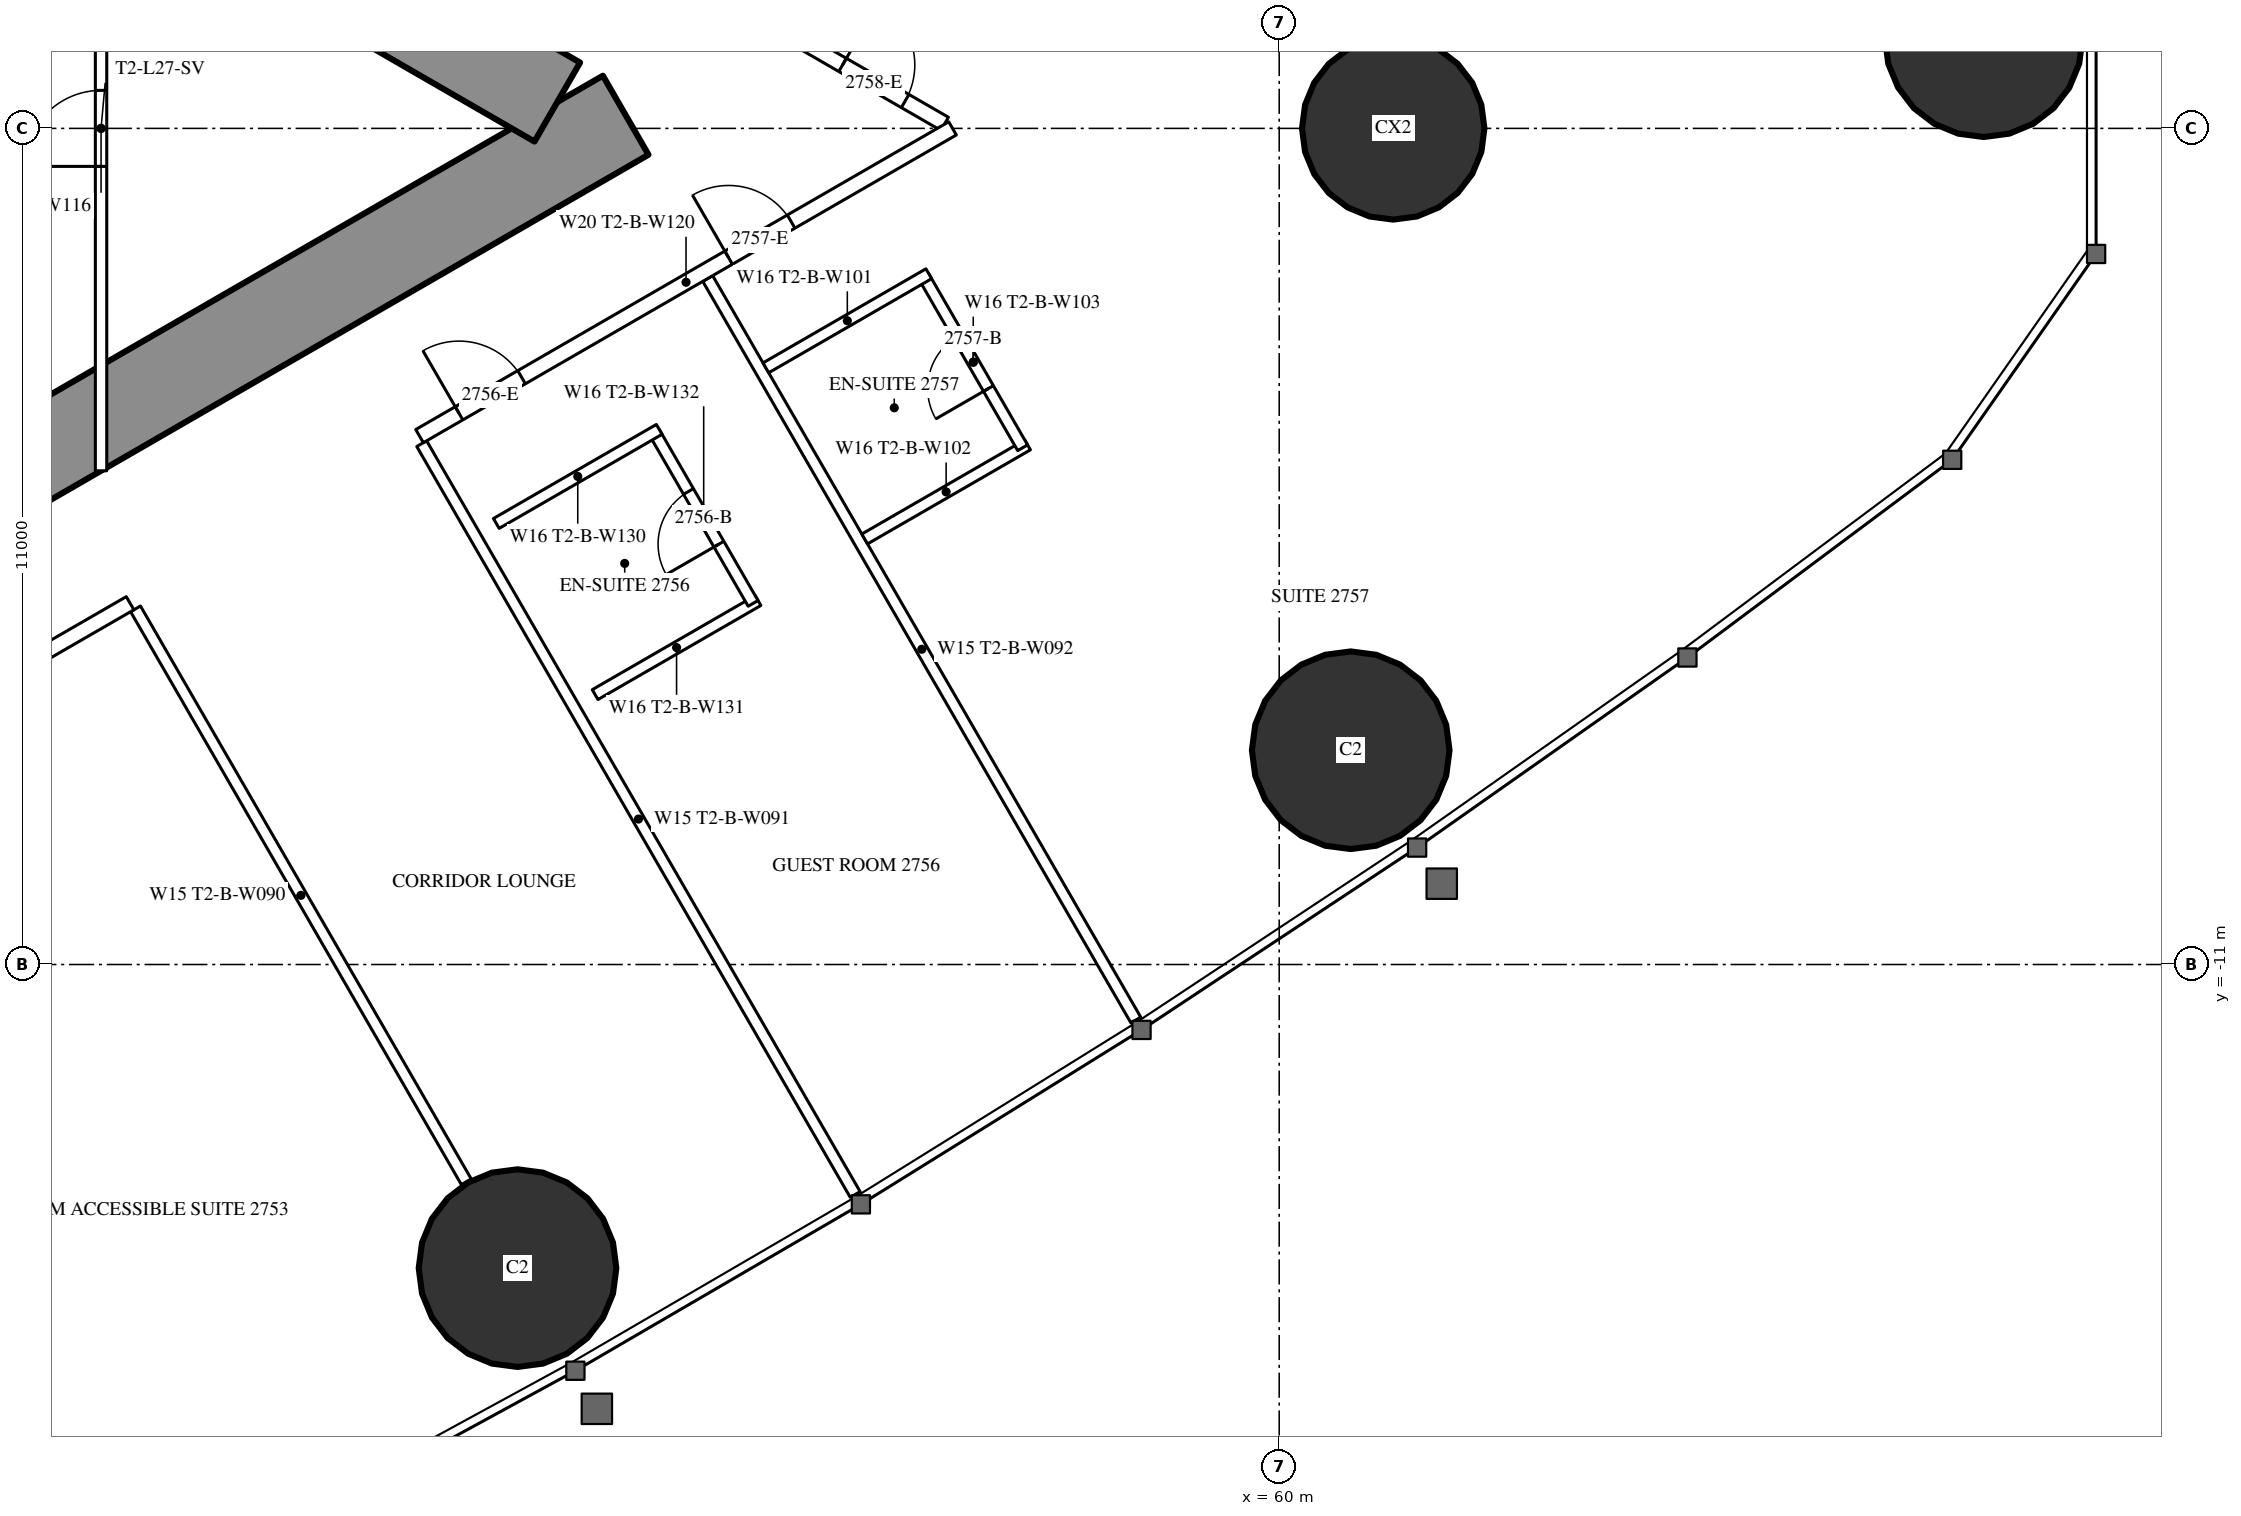
"""IFC4 building model, lengths in metres.
Left out: names, types, materials, properties, quantities, classifications, styles, units other than length and angle.
Written with IfcOpenShell. Run it as: python <this file> out.ifc"""

import sys

from ifc_helpers import new_model, si_unit, direction, frame, frame_2d, origin, origin_2d, place, context, subcontext, project, spatial, rectangle, circle, hollow_circle, extrude, element, fill, save


model = new_model("IFC4")
c1 = context("Model", 3, precision=1e-05, world=origin(), true_north=direction((0.0, 1.0)))
c2 = subcontext(c1, "Body", "Model", "MODEL_VIEW")
j1 = project(units=[si_unit("LENGTHUNIT", "METRE"), si_unit("PLANEANGLEUNIT", "RADIAN")], contexts=[c1])
p1 = place(None, origin())
s1 = spatial("IfcSite", under=j1, at=p1, CompositionType="ELEMENT")
p2 = place(p1, origin())
s2 = spatial("IfcBuilding", under=s1, at=p2, CompositionType="ELEMENT")
p3 = place(p2, frame((0.0, 0.0, 104.6)))
s3 = spatial("IfcBuildingStorey", under=s2, at=p3, CompositionType="ELEMENT", Elevation=104.6)
for number, where, z_axis, x_axis in (
    (1, (69.269, 1.187, 0.0), (0.0, 0.0, 1.0), (1.0, 0.0, 0.0)),
    (2, (49.979, -14.994, 0.0), (0.0, 0.0, 1.0), (1.0, 0.0, 0.0)),
    (3, (60.941, -8.181, 0.0), (0.0, 0.0, 1.0), (1.0, 0.0, 0.0)),
):
    element("IfcColumn", number, at=place(p3, frame(where, z_axis=z_axis, x_axis=x_axis)), inside=s3, PredefinedType="COLUMN", context=c2, shape_type="SweptSolid", body=[
        extrude(hollow_circle(Radius=1.3, WallThickness=0.1, at=origin_2d()), origin(), (0.0, 0.0, 1.0), 3.5),
    ])
p4 = place(p3, frame((61.5, 0.0, 0.0), z_axis=(0.0, 0.0, 1.0), x_axis=(1.0, 0.0, 0.0)))
e4 = element("IfcColumn", 4, at=p4, inside=s3, PredefinedType="COLUMN", context=c2, shape_type="SweptSolid", body=[
    extrude(circle(Radius=1.2, at=origin_2d()), origin(), (0.0, 0.0, 1.0), 3.5),
])
p5 = place(p3, frame((27.2, -13.8, 0.0), z_axis=(0.0, 0.0, 1.0), x_axis=(0.866027159892, 0.499996958321, 0.0)))
e5 = element("IfcWall", 5, at=p5, inside=s3, PredefinedType="SHEAR", context=c2, shape_type="SweptSolid", body=[
    extrude(rectangle(XDim=27.947, YDim=1.2, at=frame_2d((13.973, 0.0))), origin(), (0.0, 0.0, 1.0), 3.5),
])
p6 = place(p5, frame((4.6, 0.0, 0.0)))
e6 = element("IfcOpeningElement", 6, at=p6, cuts=e5, PredefinedType="OPENING", context=c2, shape_type="SweptSolid", body=[
    extrude(rectangle(XDim=1.0, YDim=2.2, at=frame_2d((0.5, 1.1))), frame((0.0, 0.61, 0.0), z_axis=(0.0, -1.0, 0.0), x_axis=(1.0, 0.0, 0.0)), (0.0, 0.0, 1.0), 1.22),
])
p7 = place(p5, frame((13.395, 0.0, 0.0)))
e7 = element("IfcOpeningElement", 7, at=p7, cuts=e5, PredefinedType="OPENING", context=c2, shape_type="SweptSolid", body=[
    extrude(rectangle(XDim=1.8, YDim=2.2, at=frame_2d((0.9, 1.1))), frame((0.0, 0.61, 0.0), z_axis=(0.0, -1.0, 0.0), x_axis=(1.0, 0.0, 0.0)), (0.0, 0.0, 1.0), 1.22),
])
p8 = place(p3, frame((27.2, 13.8, 0.0), z_axis=(0.0, 0.0, 1.0), x_axis=(0.866024515034, -0.500001539357, 0.0)))
e8 = element("IfcWall", 8, at=p8, inside=s3, PredefinedType="SHEAR", context=c2, shape_type="SweptSolid", body=[
    extrude(rectangle(XDim=26.907, YDim=1.2, at=frame_2d((13.454, 0.0))), origin(), (0.0, 0.0, 1.0), 3.5),
])
p9 = place(p8, frame((4.6, 0.0, 0.0)))
e9 = element("IfcOpeningElement", 9, at=p9, cuts=e8, PredefinedType="OPENING", context=c2, shape_type="SweptSolid", body=[
    extrude(rectangle(XDim=1.0, YDim=2.2, at=frame_2d((0.5, 1.1))), frame((0.0, 0.61, 0.0), z_axis=(0.0, -1.0, 0.0), x_axis=(1.0, 0.0, 0.0)), (0.0, 0.0, 1.0), 1.22),
])
p10 = place(p8, frame((13.395, 0.0, 0.0)))
e10 = element("IfcOpeningElement", 10, at=p10, cuts=e8, PredefinedType="OPENING", context=c2, shape_type="SweptSolid", body=[
    extrude(rectangle(XDim=1.8, YDim=2.2, at=frame_2d((0.9, 1.1))), frame((0.0, 0.61, 0.0), z_axis=(0.0, -1.0, 0.0), x_axis=(1.0, 0.0, 0.0)), (0.0, 0.0, 1.0), 1.22),
])
p11 = place(p3, frame((44.954, -6.321, 0.0), z_axis=(0.0, 0.0, 1.0), x_axis=(0.500018676722, -0.866014620505, 0.0)))
e11 = element("IfcWall", 11, at=p11, inside=s3, PredefinedType="PARTITIONING", context=c2, shape_type="SweptSolid", body=[
    extrude(rectangle(XDim=8.704, YDim=0.15, at=frame_2d((4.352, 0.0))), origin(), (0.0, 0.0, 1.0), 2.2),
])
p12 = place(p3, frame((48.719, -4.147, 0.0), z_axis=(0.0, 0.0, 1.0), x_axis=(0.499990498062, -0.866030889661, 0.0)))
e12 = element("IfcWall", 12, at=p12, inside=s3, PredefinedType="PARTITIONING", context=c2, shape_type="SweptSolid", body=[
    extrude(rectangle(XDim=11.406, YDim=0.15, at=frame_2d((5.703, 0.0))), origin(), (0.0, 0.0, 1.0), 3.25),
])
p13 = place(p3, frame((52.481, -1.975, 0.0), z_axis=(0.0, 0.0, 1.0), x_axis=(0.500003867771, -0.866023170714, 0.0)))
e13 = element("IfcWall", 13, at=p13, inside=s3, PredefinedType="PARTITIONING", context=c2, shape_type="SweptSolid", body=[
    extrude(rectangle(XDim=11.265, YDim=0.15, at=frame_2d((5.632, 0.0))), origin(), (0.0, 0.0, 1.0), 3.25),
])
p14 = place(p3, frame((36.834, 10.894, 0.0), z_axis=(0.0, 0.0, 1.0), x_axis=(0.866028157229, -0.499995230863, 0.0)))
e14 = element("IfcWall", 14, at=p14, inside=s3, PredefinedType="PARTITIONING", context=c2, shape_type="SweptSolid", body=[
    extrude(rectangle(XDim=21.667, YDim=0.2, at=frame_2d((10.833, 0.0))), origin(), (0.0, 0.0, 1.0), 3.25),
])
p15 = place(p14, frame((20.117, 0.0, 0.0)))
e15 = element("IfcOpeningElement", 15, at=p15, cuts=e14, PredefinedType="OPENING", context=c2, shape_type="SweptSolid", body=[
    extrude(rectangle(XDim=0.95, YDim=2.2, at=frame_2d((0.475, 1.1))), frame((0.0, 0.11, 0.0), z_axis=(0.0, -1.0, 0.0), x_axis=(1.0, 0.0, 0.0)), (0.0, 0.0, 1.0), 0.22),
])
p16 = place(p14, frame((14.335, 0.0, 0.0)))
e16 = element("IfcOpeningElement", 16, at=p16, cuts=e14, PredefinedType="OPENING", context=c2, shape_type="SweptSolid", body=[
    extrude(rectangle(XDim=0.95, YDim=2.2, at=frame_2d((0.475, 1.1))), frame((0.0, 0.11, 0.0), z_axis=(0.0, -1.0, 0.0), x_axis=(1.0, 0.0, 0.0)), (0.0, 0.0, 1.0), 0.22),
])
p17 = place(p14, frame((9.693, 0.0, 0.0)))
e17 = element("IfcOpeningElement", 17, at=p17, cuts=e14, PredefinedType="OPENING", context=c2, shape_type="SweptSolid", body=[
    extrude(rectangle(XDim=0.95, YDim=2.2, at=frame_2d((0.475, 1.1))), frame((0.0, 0.11, 0.0), z_axis=(0.0, -1.0, 0.0), x_axis=(1.0, 0.0, 0.0)), (0.0, 0.0, 1.0), 0.22),
])
p18 = place(p14, frame((2.95, 0.0, 0.0)))
e18 = element("IfcOpeningElement", 18, at=p18, cuts=e14, PredefinedType="OPENING", context=c2, shape_type="SweptSolid", body=[
    extrude(rectangle(XDim=0.95, YDim=2.2, at=frame_2d((0.475, 1.1))), frame((0.0, 0.11, 0.0), z_axis=(0.0, -1.0, 0.0), x_axis=(1.0, 0.0, 0.0)), (0.0, 0.0, 1.0), 0.22),
])
p19 = place(p3, frame((37.96, -10.243, 0.0), z_axis=(0.0, 0.0, 1.0), x_axis=(0.86603350054, 0.499985975746, 0.0)))
e19 = element("IfcWall", 19, at=p19, inside=s3, PredefinedType="PARTITIONING", context=c2, shape_type="SweptSolid", body=[
    extrude(rectangle(XDim=7.993, YDim=0.2, at=frame_2d((3.997, 0.0))), origin(), (0.0, 0.0, 1.0), 3.25),
])
p20 = place(p19, frame((3.35, 0.0, 0.0)))
e20 = element("IfcOpeningElement", 20, at=p20, cuts=e19, PredefinedType="OPENING", context=c2, shape_type="SweptSolid", body=[
    extrude(rectangle(XDim=1.0, YDim=2.2, at=frame_2d((0.5, 1.1))), frame((0.0, 0.11, 0.0), z_axis=(0.0, -1.0, 0.0), x_axis=(1.0, 0.0, 0.0)), (0.0, 0.0, 1.0), 0.22),
])
p21 = place(p3, frame((48.69, -4.048, 0.0), z_axis=(0.0, 0.0, 1.0), x_axis=(0.866026410209, 0.499998256818, 0.0)))
e21 = element("IfcWall", 21, at=p21, inside=s3, PredefinedType="PARTITIONING", context=c2, shape_type="SweptSolid", body=[
    extrude(rectangle(XDim=8.097, YDim=0.2, at=frame_2d((4.048, 0.0))), origin(), (0.0, 0.0, 1.0), 3.25),
])
p22 = place(p21, frame((0.6, 0.0, 0.0)))
e22 = element("IfcOpeningElement", 22, at=p22, cuts=e21, PredefinedType="OPENING", context=c2, shape_type="SweptSolid", body=[
    extrude(rectangle(XDim=0.95, YDim=2.2, at=frame_2d((0.475, 1.1))), frame((0.0, 0.11, 0.0), z_axis=(0.0, -1.0, 0.0), x_axis=(1.0, 0.0, 0.0)), (0.0, 0.0, 1.0), 0.22),
])
p23 = place(p21, frame((4.695, 0.0, 0.0)))
e23 = element("IfcOpeningElement", 23, at=p23, cuts=e21, PredefinedType="OPENING", context=c2, shape_type="SweptSolid", body=[
    extrude(rectangle(XDim=0.95, YDim=2.2, at=frame_2d((0.475, 1.1))), frame((0.0, 0.11, 0.0), z_axis=(0.0, -1.0, 0.0), x_axis=(1.0, 0.0, 0.0)), (0.0, 0.0, 1.0), 0.22),
])
p24 = place(p3, frame((51.0, -7.449, 0.0), z_axis=(0.0, 0.0, 1.0), x_axis=(0.866006523861, 0.500032699561, 0.0)))
e24 = element("IfcWall", 24, at=p24, inside=s3, PredefinedType="PARTITIONING", context=c2, shape_type="SweptSolid", body=[
    extrude(rectangle(XDim=2.475, YDim=0.15, at=frame_2d((1.237, 0.0))), origin(), (0.0, 0.0, 1.0), 3.25),
])
p25 = place(p3, frame((51.778, -3.998, 0.0), z_axis=(0.0, 0.0, 1.0), x_axis=(0.500047596559, -0.865997922154, 0.0)))
e25 = element("IfcWall", 25, at=p25, inside=s3, PredefinedType="PARTITIONING", context=c2, shape_type="SweptSolid", body=[
    extrude(rectangle(XDim=2.6, YDim=0.15, at=frame_2d((1.3, 0.0))), origin(), (0.0, 0.0, 1.0), 3.25),
])
p26 = place(p25, frame((0.9, 0.0, 0.0)))
e26 = element("IfcOpeningElement", 26, at=p26, cuts=e25, PredefinedType="OPENING", context=c2, shape_type="SweptSolid", body=[
    extrude(rectangle(XDim=0.8, YDim=2.2, at=frame_2d((0.4, 1.1))), frame((0.0, 0.085, 0.0), z_axis=(0.0, -1.0, 0.0), x_axis=(1.0, 0.0, 0.0)), (0.0, 0.0, 1.0), 0.17),
])
for number, where, z_axis, x_axis in (
    (27, (49.7, -5.198, 0.0), (0.0, 0.0, 1.0), (0.866, 0.5, 0.0)),
    (28, (54.546, -5.402, 0.0), (0.0, 0.0, 1.0), (0.866, 0.5, 0.0)),
):
    element("IfcWall", number, at=place(p3, frame(where, z_axis=z_axis, x_axis=x_axis)), inside=s3, PredefinedType="PARTITIONING", context=c2, shape_type="SweptSolid", body=[
        extrude(rectangle(XDim=2.475, YDim=0.15, at=frame_2d((1.237, 0.0))), origin(), (0.0, 0.0, 1.0), 3.25),
    ])
p27 = place(p3, frame((55.325, -1.95, 0.0), z_axis=(0.0, 0.0, 1.0), x_axis=(0.500006934395, -0.866021400173, 0.0)))
e29 = element("IfcWall", 29, at=p27, inside=s3, PredefinedType="PARTITIONING", context=c2, shape_type="SweptSolid", body=[
    extrude(rectangle(XDim=2.6, YDim=0.15, at=frame_2d((1.3, 0.0))), origin(), (0.0, 0.0, 1.0), 3.25),
])
p28 = place(p27, frame((0.9, 0.0, 0.0)))
e30 = element("IfcOpeningElement", 30, at=p28, cuts=e29, PredefinedType="OPENING", context=c2, shape_type="SweptSolid", body=[
    extrude(rectangle(XDim=0.8, YDim=2.2, at=frame_2d((0.4, 1.1))), frame((0.0, 0.085, 0.0), z_axis=(0.0, -1.0, 0.0), x_axis=(1.0, 0.0, 0.0)), (0.0, 0.0, 1.0), 0.17),
])
p29 = place(p3, frame((53.246, -3.15, 0.0), z_axis=(0.0, 0.0, 1.0), x_axis=(0.866006523861, 0.500032699561, 0.0)))
e31 = element("IfcWall", 31, at=p29, inside=s3, PredefinedType="PARTITIONING", context=c2, shape_type="SweptSolid", body=[
    extrude(rectangle(XDim=2.475, YDim=0.15, at=frame_2d((1.237, 0.0))), origin(), (0.0, 0.0, 1.0), 3.25),
])
p30 = place(p3, frame((44.5, -4.505, 0.0), z_axis=(0.0, 0.0, 1.0), x_axis=(0.0, 1.0, 0.0)))
e32 = element("IfcWall", 32, at=p30, inside=s3, PredefinedType="PARTITIONING", context=c2, shape_type="SweptSolid", body=[
    extrude(rectangle(XDim=9.009, YDim=0.15, at=frame_2d((4.505, 0.0))), origin(), (0.0, 0.0, 1.0), 2.45),
])
p31 = place(p30, frame((4.005, 0.0, 0.0)))
e33 = element("IfcOpeningElement", 33, at=p31, cuts=e32, PredefinedType="OPENING", context=c2, shape_type="SweptSolid", body=[
    extrude(rectangle(XDim=1.0, YDim=2.2, at=frame_2d((0.5, 1.1))), frame((0.0, 0.085, 0.0), z_axis=(0.0, -1.0, 0.0), x_axis=(1.0, 0.0, 0.0)), (0.0, 0.0, 1.0), 0.17),
])
p32 = place(p26, origin())
e34 = element("IfcDoor", 34, at=p32, inside=s3, OperationType="SINGLE_SWING_RIGHT", PredefinedType="DOOR", context=c2, shape_type="SweptSolid", body=[
    extrude(rectangle(XDim=0.8, YDim=2.2, at=frame_2d((0.4, 1.1))), frame((0.0, 0.025, 0.0), z_axis=(0.0, -1.0, 0.0), x_axis=(1.0, 0.0, 0.0)), (0.0, 0.0, 1.0), 0.05),
])
fill(e26, e34)
p33 = place(p22, origin())
e35 = element("IfcDoor", 35, at=p33, inside=s3, OperationType="SINGLE_SWING_LEFT", PredefinedType="DOOR", context=c2, shape_type="SweptSolid", body=[
    extrude(rectangle(XDim=0.95, YDim=2.2, at=frame_2d((0.475, 1.1))), frame((0.0, 0.025, 0.0), z_axis=(0.0, -1.0, 0.0), x_axis=(1.0, 0.0, 0.0)), (0.0, 0.0, 1.0), 0.05),
])
fill(e22, e35)
p34 = place(p28, origin())
e36 = element("IfcDoor", 36, at=p34, inside=s3, OperationType="SINGLE_SWING_RIGHT", PredefinedType="DOOR", context=c2, shape_type="SweptSolid", body=[
    extrude(rectangle(XDim=0.8, YDim=2.2, at=frame_2d((0.4, 1.1))), frame((0.0, 0.025, 0.0), z_axis=(0.0, -1.0, 0.0), x_axis=(1.0, 0.0, 0.0)), (0.0, 0.0, 1.0), 0.05),
])
fill(e30, e36)
p35 = place(p23, origin())
e37 = element("IfcDoor", 37, at=p35, inside=s3, OperationType="SINGLE_SWING_LEFT", PredefinedType="DOOR", context=c2, shape_type="SweptSolid", body=[
    extrude(rectangle(XDim=0.95, YDim=2.2, at=frame_2d((0.475, 1.1))), frame((0.0, 0.025, 0.0), z_axis=(0.0, -1.0, 0.0), x_axis=(1.0, 0.0, 0.0)), (0.0, 0.0, 1.0), 0.05),
])
fill(e23, e37)
p36 = place(p15, origin())
e38 = element("IfcDoor", 38, at=p36, inside=s3, OperationType="SINGLE_SWING_LEFT", PredefinedType="DOOR", context=c2, shape_type="SweptSolid", body=[
    extrude(rectangle(XDim=0.95, YDim=2.2, at=frame_2d((0.475, 1.1))), frame((0.0, 0.025, 0.0), z_axis=(0.0, -1.0, 0.0), x_axis=(1.0, 0.0, 0.0)), (0.0, 0.0, 1.0), 0.05),
])
fill(e15, e38)
p37 = place(p31, origin())
e39 = element("IfcDoor", 39, at=p37, inside=s3, OperationType="SINGLE_SWING_LEFT", PredefinedType="DOOR", context=c2, shape_type="SweptSolid", body=[
    extrude(rectangle(XDim=1.0, YDim=2.2, at=frame_2d((0.5, 1.1))), frame((0.0, 0.025, 0.0), z_axis=(0.0, -1.0, 0.0), x_axis=(1.0, 0.0, 0.0)), (0.0, 0.0, 1.0), 0.05),
])
fill(e33, e39)
save(model, sys.argv[1])
